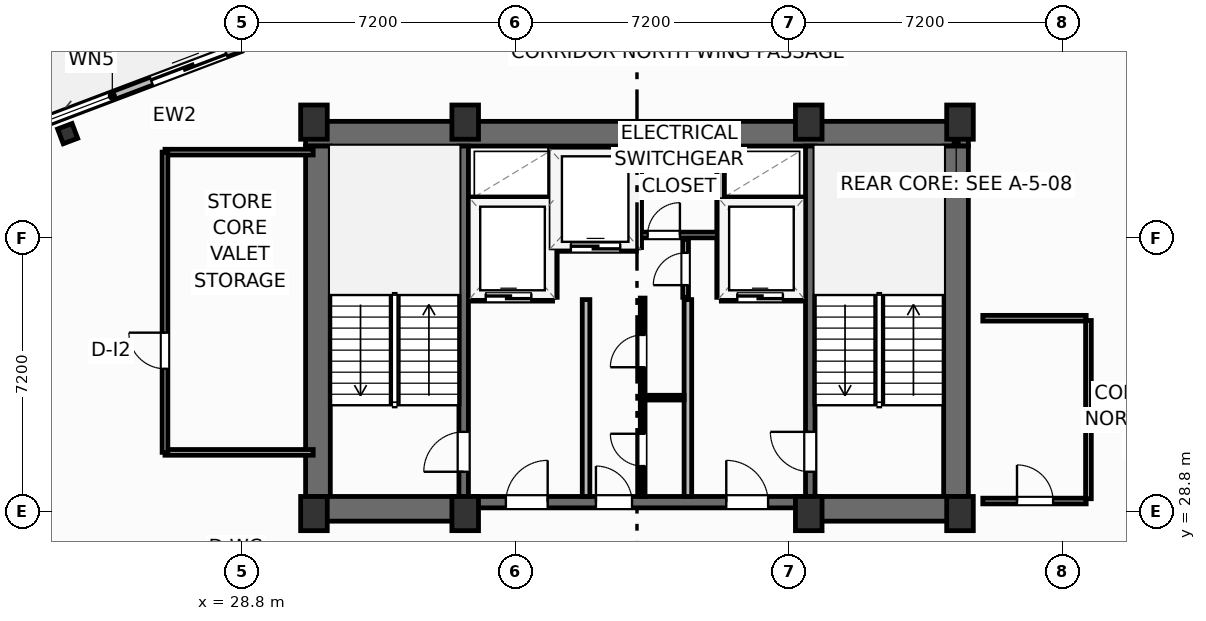
"""IFC4 building model, lengths in metres.
Left out: names, types, materials, properties, quantities, classifications, styles, units other than length and angle.
Written with IfcOpenShell. Run it as: python <this file> out.ifc"""

import sys

from ifc_helpers import new_model, si_unit, direction, frame, frame_2d, origin, origin_2d, place, context, subcontext, project, spatial, rectangle, i_section, extrude, element, fill, save


model = new_model("IFC4")
c1 = context("Model", 3, precision=1e-05, world=origin(), true_north=direction((0.0, 1.0)))
c2 = subcontext(c1, "Body", "Model", "MODEL_VIEW")
j1 = project(units=[si_unit("LENGTHUNIT", "METRE"), si_unit("PLANEANGLEUNIT", "RADIAN")], contexts=[c1])
p1 = place(None, origin())
s1 = spatial("IfcSite", under=j1, at=p1, CompositionType="ELEMENT")
p2 = place(p1, origin())
s2 = spatial("IfcBuilding", under=s1, at=p2, CompositionType="ELEMENT")
p3 = place(p2, frame((0.0, 0.0, 246.0)))
s3 = spatial("IfcBuildingStorey", under=s2, at=p3, CompositionType="ELEMENT", Elevation=246.0)
for number, where, z_axis, x_axis in (
    (1, (30.7, 28.75, 0.0), (0.0, 0.0, 1.0), (1.0, 0.0, 0.0)),
    (2, (34.68, 28.75, 0.0), (0.0, 0.0, 1.0), (1.0, 0.0, 0.0)),
    (3, (43.72, 28.75, 0.0), (0.0, 0.0, 1.0), (1.0, 0.0, 0.0)),
    (4, (47.7, 28.75, 0.0), (0.0, 0.0, 1.0), (1.0, 0.0, 0.0)),
    (5, (30.7, 39.05, 0.0), (0.0, 0.0, 1.0), (1.0, 0.0, 0.0)),
    (6, (34.68, 39.05, 0.0), (0.0, 0.0, 1.0), (1.0, 0.0, 0.0)),
    (7, (43.72, 39.05, 0.0), (0.0, 0.0, 1.0), (1.0, 0.0, 0.0)),
    (8, (47.7, 39.05, 0.0), (0.0, 0.0, 1.0), (1.0, 0.0, 0.0)),
):
    element("IfcColumn", number, at=place(p3, frame(where, z_axis=z_axis, x_axis=x_axis)), inside=s3, PredefinedType="COLUMN", context=c2, shape_type="SweptSolid", body=[
        extrude(rectangle(XDim=0.7, YDim=0.9, at=origin_2d()), origin(), (0.0, 0.0, 1.0), 3.7),
    ])
p4 = place(p3, frame((30.48, 38.745, 0.0), z_axis=(0.0, 0.0, 1.0), x_axis=(1.0, 0.0, 0.0)))
e9 = element("IfcWall", 9, at=p4, inside=s3, PredefinedType="SHEAR", context=c2, shape_type="SweptSolid", body=[
    extrude(rectangle(XDim=17.44, YDim=0.65, at=frame_2d((8.72, 0.0))), origin(), (0.0, 0.0, 1.0), 3.45),
])
for number, where, z_axis, x_axis in (
    (10, (30.805, 29.2, 0.0), (0.0, 0.0, 1.0), (0.0, 1.0, 0.0)),
    (11, (47.595, 29.2, 0.0), (0.0, 0.0, 1.0), (0.0, 1.0, 0.0)),
):
    element("IfcWall", number, at=place(p3, frame(where, z_axis=z_axis, x_axis=x_axis)), inside=s3, PredefinedType="SHEAR", context=c2, shape_type="SweptSolid", body=[
        extrude(rectangle(XDim=9.22, YDim=0.65, at=frame_2d((4.61, 0.0))), origin(), (0.0, 0.0, 1.0), 3.45),
    ])
p5 = place(p3, frame((30.48, 28.875, 0.0), z_axis=(0.0, 0.0, 1.0), x_axis=(1.0, 0.0, 0.0)))
e12 = element("IfcWall", 12, at=p5, inside=s3, PredefinedType="SHEAR", context=c2, shape_type="SweptSolid", body=[
    extrude(rectangle(XDim=4.32, YDim=0.65, at=frame_2d((2.16, 0.0))), origin(), (0.0, 0.0, 1.0), 3.45),
])
p6 = place(p3, frame((43.6, 28.875, 0.0), z_axis=(0.0, 0.0, 1.0), x_axis=(1.0, 0.0, 0.0)))
e13 = element("IfcWall", 13, at=p6, inside=s3, PredefinedType="SHEAR", context=c2, shape_type="SweptSolid", body=[
    extrude(rectangle(XDim=4.32, YDim=0.65, at=frame_2d((2.16, 0.0))), origin(), (0.0, 0.0, 1.0), 3.45),
])
p7 = place(p3, frame((34.8, 29.05, 0.0), z_axis=(0.0, 0.0, 1.0), x_axis=(1.0, 0.0, 0.0)))
e14 = element("IfcWall", 14, at=p7, inside=s3, PredefinedType="SHEAR", context=c2, shape_type="SweptSolid", body=[
    extrude(rectangle(XDim=8.8, YDim=0.3, at=frame_2d((4.4, 0.0))), origin(), (0.0, 0.0, 1.0), 3.45),
])
p8 = place(p7, frame((0.95, 0.0, 0.0)))
e15 = element("IfcOpeningElement", 15, at=p8, cuts=e14, PredefinedType="OPENING", context=c2, shape_type="SweptSolid", body=[
    extrude(rectangle(XDim=1.1, YDim=2.15, at=frame_2d((0.55, 1.075))), frame((0.0, 0.16, 0.0), z_axis=(0.0, -1.0, 0.0), x_axis=(1.0, 0.0, 0.0)), (0.0, 0.0, 1.0), 0.32),
])
p9 = place(p7, frame((6.75, 0.0, 0.0)))
e16 = element("IfcOpeningElement", 16, at=p9, cuts=e14, PredefinedType="OPENING", context=c2, shape_type="SweptSolid", body=[
    extrude(rectangle(XDim=1.1, YDim=2.15, at=frame_2d((0.55, 1.075))), frame((0.0, 0.16, 0.0), z_axis=(0.0, -1.0, 0.0), x_axis=(1.0, 0.0, 0.0)), (0.0, 0.0, 1.0), 0.32),
])
p10 = place(p7, frame((3.32, 0.0, 0.0)))
e17 = element("IfcOpeningElement", 17, at=p10, cuts=e14, PredefinedType="OPENING", context=c2, shape_type="SweptSolid", body=[
    extrude(rectangle(XDim=0.95, YDim=2.15, at=frame_2d((0.475, 1.075))), frame((0.0, 0.16, 0.0), z_axis=(0.0, -1.0, 0.0), x_axis=(1.0, 0.0, 0.0)), (0.0, 0.0, 1.0), 0.32),
])
p11 = place(p3, frame((34.64, 29.2, 0.0), z_axis=(0.0, 0.0, 1.0), x_axis=(0.0, 1.0, 0.0)))
e18 = element("IfcWall", 18, at=p11, inside=s3, PredefinedType="SHEAR", context=c2, shape_type="SweptSolid", body=[
    extrude(rectangle(XDim=9.22, YDim=0.25, at=frame_2d((4.61, 0.0))), origin(), (0.0, 0.0, 1.0), 3.45),
])
p12 = place(p11, frame((0.65, 0.0, 0.0)))
e19 = element("IfcOpeningElement", 19, at=p12, cuts=e18, PredefinedType="OPENING", context=c2, shape_type="SweptSolid", body=[
    extrude(rectangle(XDim=1.05, YDim=2.15, at=frame_2d((0.525, 1.075))), frame((0.0, 0.135, 0.0), z_axis=(0.0, -1.0, 0.0), x_axis=(1.0, 0.0, 0.0)), (0.0, 0.0, 1.0), 0.27),
])
p13 = place(p3, frame((43.76, 29.2, 0.0), z_axis=(0.0, 0.0, 1.0), x_axis=(0.0, 1.0, 0.0)))
e20 = element("IfcWall", 20, at=p13, inside=s3, PredefinedType="SHEAR", context=c2, shape_type="SweptSolid", body=[
    extrude(rectangle(XDim=9.22, YDim=0.25, at=frame_2d((4.61, 0.0))), origin(), (0.0, 0.0, 1.0), 3.45),
])
p14 = place(p13, frame((0.65, 0.0, 0.0)))
e21 = element("IfcOpeningElement", 21, at=p14, cuts=e20, PredefinedType="OPENING", context=c2, shape_type="SweptSolid", body=[
    extrude(rectangle(XDim=1.05, YDim=2.15, at=frame_2d((0.525, 1.075))), frame((0.0, 0.135, 0.0), z_axis=(0.0, -1.0, 0.0), x_axis=(1.0, 0.0, 0.0)), (0.0, 0.0, 1.0), 0.27),
])
p15 = place(p3, frame((24.219, 38.747, 0.0), z_axis=(0.0, 0.0, 1.0), x_axis=(0.935221751401, 0.354062530786, 0.0)))
e22 = element("IfcColumn", 22, at=p15, inside=s3, PredefinedType="COLUMN", context=c2, shape_type="SweptSolid", body=[
    extrude(i_section(OverallWidth=0.406, OverallDepth=0.416, WebThickness=0.03, FlangeThickness=0.048, FilletRadius=0.025, at=origin_2d()), origin(), (0.0, 0.0, 1.0), 3.7),
])
p16 = place(p3, frame((23.149, 38.887, 0.0), z_axis=(0.0, 0.0, 1.0), x_axis=(0.9352192676, 0.354069091436, 0.0)))
e23 = element("IfcWall", 23, at=p16, inside=s3, PredefinedType="SOLIDWALL", context=c2, shape_type="SweptSolid", body=[
    extrude(rectangle(XDim=6.0, YDim=0.22, at=frame_2d((3.0, 0.0))), origin(), (0.0, 0.0, 1.0), 2.73),
])
p17 = place(p16, frame((3.5, 0.0, 0.0)))
e24 = element("IfcOpeningElement", 24, at=p17, cuts=e23, PredefinedType="OPENING", context=c2, shape_type="SweptSolid", body=[
    extrude(rectangle(XDim=2.1, YDim=2.3, at=frame_2d((1.05, 1.15))), frame((0.0, 0.12, 0.0), z_axis=(0.0, -1.0, 0.0), x_axis=(1.0, 0.0, 0.0)), (0.0, 0.0, 1.0), 0.24),
])
p18 = place(p16, frame((0.55, 0.0, 0.75)))
e25 = element("IfcOpeningElement", 25, at=p18, cuts=e23, PredefinedType="OPENING", context=c2, shape_type="SweptSolid", body=[
    extrude(rectangle(XDim=1.85, YDim=1.75, at=frame_2d((0.925, 0.875))), frame((0.0, 0.12, 0.0), z_axis=(0.0, -1.0, 0.0), x_axis=(1.0, 0.0, 0.0)), (0.0, 0.0, 1.0), 0.24),
])
for number, where, z_axis, x_axis in (
    (26, (37.86, 29.2, 0.0), (0.0, 0.0, 1.0), (0.0, 1.0, 0.0)),
    (27, (40.54, 29.2, 0.0), (0.0, 0.0, 1.0), (0.0, 1.0, 0.0)),
):
    element("IfcWall", number, at=place(p3, frame(where, z_axis=z_axis, x_axis=x_axis)), inside=s3, PredefinedType="PARTITIONING", context=c2, shape_type="SweptSolid", body=[
        extrude(rectangle(XDim=5.18, YDim=0.2, at=frame_2d((2.59, 0.0))), origin(), (0.0, 0.0, 1.0), 3.45),
    ])
p19 = place(p3, frame((34.8, 34.44, 0.0), z_axis=(0.0, 0.0, 1.0), x_axis=(1.0, 0.0, 0.0)))
e28 = element("IfcWall", 28, at=p19, inside=s3, PredefinedType="PARTITIONING", context=c2, shape_type="SweptSolid", body=[
    extrude(rectangle(XDim=2.18, YDim=0.2, at=frame_2d((1.09, 0.0))), origin(), (0.0, 0.0, 1.0), 3.45),
])
p20 = place(p19, frame((0.42, 0.0, 0.0)))
e29 = element("IfcOpeningElement", 29, at=p20, cuts=e28, PredefinedType="OPENING", context=c2, shape_type="SweptSolid", body=[
    extrude(rectangle(XDim=1.2, YDim=2.2, at=frame_2d((0.6, 1.1))), frame((0.0, 0.11, 0.0), z_axis=(0.0, -1.0, 0.0), x_axis=(1.0, 0.0, 0.0)), (0.0, 0.0, 1.0), 0.22),
])
p21 = place(p3, frame((34.8, 36.98, 0.0), z_axis=(0.0, 0.0, 1.0), x_axis=(1.0, 0.0, 0.0)))
e30 = element("IfcWall", 30, at=p21, inside=s3, PredefinedType="PARTITIONING", context=c2, shape_type="SweptSolid", body=[
    extrude(rectangle(XDim=2.18, YDim=0.2, at=frame_2d((1.09, 0.0))), origin(), (0.0, 0.0, 1.0), 3.45),
])
p22 = place(p3, frame((37.0, 34.44, 0.0), z_axis=(0.0, 0.0, 1.0), x_axis=(0.0, 1.0, 0.0)))
e31 = element("IfcWall", 31, at=p22, inside=s3, PredefinedType="PARTITIONING", context=c2, shape_type="SweptSolid", body=[
    extrude(rectangle(XDim=3.9, YDim=0.2, at=frame_2d((1.95, 0.0))), origin(), (0.0, 0.0, 1.0), 3.45),
])
p23 = place(p3, frame((41.42, 34.44, 0.0), z_axis=(0.0, 0.0, 1.0), x_axis=(1.0, 0.0, 0.0)))
e32 = element("IfcWall", 32, at=p23, inside=s3, PredefinedType="PARTITIONING", context=c2, shape_type="SweptSolid", body=[
    extrude(rectangle(XDim=2.18, YDim=0.2, at=frame_2d((1.09, 0.0))), origin(), (0.0, 0.0, 1.0), 3.45),
])
p24 = place(p23, frame((0.42, 0.0, 0.0)))
e33 = element("IfcOpeningElement", 33, at=p24, cuts=e32, PredefinedType="OPENING", context=c2, shape_type="SweptSolid", body=[
    extrude(rectangle(XDim=1.2, YDim=2.2, at=frame_2d((0.6, 1.1))), frame((0.0, 0.11, 0.0), z_axis=(0.0, -1.0, 0.0), x_axis=(1.0, 0.0, 0.0)), (0.0, 0.0, 1.0), 0.22),
])
p25 = place(p3, frame((41.42, 36.98, 0.0), z_axis=(0.0, 0.0, 1.0), x_axis=(1.0, 0.0, 0.0)))
e34 = element("IfcWall", 34, at=p25, inside=s3, PredefinedType="PARTITIONING", context=c2, shape_type="SweptSolid", body=[
    extrude(rectangle(XDim=2.18, YDim=0.2, at=frame_2d((1.09, 0.0))), origin(), (0.0, 0.0, 1.0), 3.45),
])
p26 = place(p3, frame((41.4, 34.44, 0.0), z_axis=(0.0, 0.0, 1.0), x_axis=(0.0, 1.0, 0.0)))
e35 = element("IfcWall", 35, at=p26, inside=s3, PredefinedType="PARTITIONING", context=c2, shape_type="SweptSolid", body=[
    extrude(rectangle(XDim=3.9, YDim=0.2, at=frame_2d((1.95, 0.0))), origin(), (0.0, 0.0, 1.0), 3.45),
])
p27 = place(p3, frame((37.06, 35.75, 0.0), z_axis=(0.0, 0.0, 1.0), x_axis=(1.0, 0.0, 0.0)))
e36 = element("IfcWall", 36, at=p27, inside=s3, PredefinedType="PARTITIONING", context=c2, shape_type="SweptSolid", body=[
    extrude(rectangle(XDim=2.12, YDim=0.2, at=frame_2d((1.06, 0.0))), origin(), (0.0, 0.0, 1.0), 3.45),
])
p28 = place(p27, frame((0.4, 0.0, 0.0)))
e37 = element("IfcOpeningElement", 37, at=p28, cuts=e36, PredefinedType="OPENING", context=c2, shape_type="SweptSolid", body=[
    extrude(rectangle(XDim=1.3, YDim=2.2, at=frame_2d((0.65, 1.1))), frame((0.0, 0.11, 0.0), z_axis=(0.0, -1.0, 0.0), x_axis=(1.0, 0.0, 0.0)), (0.0, 0.0, 1.0), 0.22),
])
p29 = place(p3, frame((39.22, 35.75, 0.0), z_axis=(0.0, 0.0, 1.0), x_axis=(0.0, 1.0, 0.0)))
e38 = element("IfcWall", 38, at=p29, inside=s3, PredefinedType="PARTITIONING", context=c2, shape_type="SweptSolid", body=[
    extrude(rectangle(XDim=2.59, YDim=0.2, at=frame_2d((1.295, 0.0))), origin(), (0.0, 0.0, 1.0), 3.45),
])
p30 = place(p3, frame((39.3, 36.08, 0.0), z_axis=(0.0, 0.0, 1.0), x_axis=(1.0, 0.0, 0.0)))
e39 = element("IfcWall", 39, at=p30, inside=s3, PredefinedType="PARTITIONING", context=c2, shape_type="SweptSolid", body=[
    extrude(rectangle(XDim=2.02, YDim=0.15, at=frame_2d((1.01, 0.0))), origin(), (0.0, 0.0, 1.0), 3.45),
])
p31 = place(p30, frame((0.18, 0.0, 0.0)))
e40 = element("IfcOpeningElement", 40, at=p31, cuts=e39, PredefinedType="OPENING", context=c2, shape_type="SweptSolid", body=[
    extrude(rectangle(XDim=0.85, YDim=2.05, at=frame_2d((0.425, 1.025))), frame((0.0, 0.085, 0.0), z_axis=(0.0, -1.0, 0.0), x_axis=(1.0, 0.0, 0.0)), (0.0, 0.0, 1.0), 0.17),
])
p32 = place(p3, frame((40.48, 34.44, 0.0), z_axis=(0.0, 0.0, 1.0), x_axis=(0.0, 1.0, 0.0)))
e41 = element("IfcWall", 41, at=p32, inside=s3, PredefinedType="PARTITIONING", context=c2, shape_type="SweptSolid", body=[
    extrude(rectangle(XDim=1.52, YDim=0.15, at=frame_2d((0.76, 0.0))), origin(), (0.0, 0.0, 1.0), 3.45),
])
p33 = place(p32, frame((0.32, 0.0, 0.0)))
e42 = element("IfcOpeningElement", 42, at=p33, cuts=e41, PredefinedType="OPENING", context=c2, shape_type="SweptSolid", body=[
    extrude(rectangle(XDim=0.85, YDim=2.05, at=frame_2d((0.425, 1.025))), frame((0.0, 0.085, 0.0), z_axis=(0.0, -1.0, 0.0), x_axis=(1.0, 0.0, 0.0)), (0.0, 0.0, 1.0), 0.17),
])
p34 = place(p3, frame((39.35, 31.8, 0.0), z_axis=(0.0, 0.0, 1.0), x_axis=(1.0, 0.0, 0.0)))
e43 = element("IfcWall", 43, at=p34, inside=s3, PredefinedType="PARTITIONING", context=c2, shape_type="SweptSolid", body=[
    extrude(rectangle(XDim=1.09, YDim=0.125, at=frame_2d((0.545, 0.0))), origin(), (0.0, 0.0, 1.0), 3.45),
])
p35 = place(p3, frame((39.35, 29.2, 0.0), z_axis=(0.0, 0.0, 1.0), x_axis=(0.0, 1.0, 0.0)))
e44 = element("IfcWall", 44, at=p35, inside=s3, PredefinedType="PARTITIONING", context=c2, shape_type="SweptSolid", body=[
    extrude(rectangle(XDim=5.22, YDim=0.125, at=frame_2d((2.61, 0.0))), origin(), (0.0, 0.0, 1.0), 3.45),
])
p36 = place(p35, frame((0.8, 0.0, 0.0)))
e45 = element("IfcOpeningElement", 45, at=p36, cuts=e44, PredefinedType="OPENING", context=c2, shape_type="SweptSolid", body=[
    extrude(rectangle(XDim=0.85, YDim=2.05, at=frame_2d((0.425, 1.025))), frame((0.0, 0.073, 0.0), z_axis=(0.0, -1.0, 0.0), x_axis=(1.0, 0.0, 0.0)), (0.0, 0.0, 1.0), 0.145),
])
p37 = place(p35, frame((3.4, 0.0, 0.0)))
e46 = element("IfcOpeningElement", 46, at=p37, cuts=e44, PredefinedType="OPENING", context=c2, shape_type="SweptSolid", body=[
    extrude(rectangle(XDim=0.85, YDim=2.05, at=frame_2d((0.425, 1.025))), frame((0.0, 0.073, 0.0), z_axis=(0.0, -1.0, 0.0), x_axis=(1.0, 0.0, 0.0)), (0.0, 0.0, 1.0), 0.145),
])
for number, where, z_axis, x_axis in (
    (47, (26.78, 30.36, 0.0), (0.0, 0.0, 1.0), (1.0, 0.0, 0.0)),
    (48, (26.78, 38.26, 0.0), (0.0, 0.0, 1.0), (1.0, 0.0, 0.0)),
):
    element("IfcWall", number, at=place(p3, frame(where, z_axis=z_axis, x_axis=x_axis)), inside=s3, PredefinedType="PARTITIONING", context=c2, shape_type="SweptSolid", body=[
        extrude(rectangle(XDim=3.9, YDim=0.15, at=frame_2d((1.95, 0.0))), origin(), (0.0, 0.0, 1.0), 3.45),
    ])
p38 = place(p3, frame((26.78, 30.36, 0.0), z_axis=(0.0, 0.0, 1.0), x_axis=(0.0, 1.0, 0.0)))
e49 = element("IfcWall", 49, at=p38, inside=s3, PredefinedType="PARTITIONING", context=c2, shape_type="SweptSolid", body=[
    extrude(rectangle(XDim=7.9, YDim=0.15, at=frame_2d((3.95, 0.0))), origin(), (0.0, 0.0, 1.0), 3.45),
])
p39 = place(p38, frame((2.2, 0.0, 0.0)))
e50 = element("IfcOpeningElement", 50, at=p39, cuts=e49, PredefinedType="OPENING", context=c2, shape_type="SweptSolid", body=[
    extrude(rectangle(XDim=0.95, YDim=2.05, at=frame_2d((0.475, 1.025))), frame((0.0, 0.085, 0.0), z_axis=(0.0, -1.0, 0.0), x_axis=(1.0, 0.0, 0.0)), (0.0, 0.0, 1.0), 0.17),
])
p40 = place(p3, frame((48.3, 29.08, 0.0), z_axis=(0.0, 0.0, 1.0), x_axis=(1.0, 0.0, 0.0)))
e51 = element("IfcWall", 51, at=p40, inside=s3, PredefinedType="PARTITIONING", context=c2, shape_type="SweptSolid", body=[
    extrude(rectangle(XDim=2.72, YDim=0.15, at=frame_2d((1.36, 0.0))), origin(), (0.0, 0.0, 1.0), 2.662),
])
p41 = place(p40, frame((0.9, 0.0, 0.0)))
e52 = element("IfcOpeningElement", 52, at=p41, cuts=e51, PredefinedType="OPENING", context=c2, shape_type="SweptSolid", body=[
    extrude(rectangle(XDim=0.95, YDim=2.05, at=frame_2d((0.475, 1.025))), frame((0.0, 0.085, 0.0), z_axis=(0.0, -1.0, 0.0), x_axis=(1.0, 0.0, 0.0)), (0.0, 0.0, 1.0), 0.17),
])
p42 = place(p3, frame((48.3, 33.89, 0.0), z_axis=(0.0, 0.0, 1.0), x_axis=(1.0, 0.0, 0.0)))
e53 = element("IfcWall", 53, at=p42, inside=s3, PredefinedType="PARTITIONING", context=c2, shape_type="SweptSolid", body=[
    extrude(rectangle(XDim=2.72, YDim=0.15, at=frame_2d((1.36, 0.0))), origin(), (0.0, 0.0, 1.0), 3.45),
])
p43 = place(p3, frame((51.08, 29.14, 0.0), z_axis=(0.0, 0.0, 1.0), x_axis=(0.0, 1.0, 0.0)))
e54 = element("IfcWall", 54, at=p43, inside=s3, PredefinedType="PARTITIONING", context=c2, shape_type="SweptSolid", body=[
    extrude(rectangle(XDim=4.69, YDim=0.15, at=frame_2d((2.345, 0.0))), origin(), (0.0, 0.0, 1.0), 3.45),
])
p44 = place(p17, origin())
e55 = element("IfcDoor", 55, at=p44, inside=s3, OperationType="SLIDING_TO_LEFT", PredefinedType="DOOR", context=c2, shape_type="SweptSolid", body=[
    extrude(rectangle(XDim=2.1, YDim=2.3, at=frame_2d((1.05, 1.15))), frame((0.0, 0.025, 0.0), z_axis=(0.0, -1.0, 0.0), x_axis=(1.0, 0.0, 0.0)), (0.0, 0.0, 1.0), 0.05),
])
fill(e24, e55)
p45 = place(p18, origin())
e56 = element("IfcWindow", 56, at=p45, inside=s3, PartitioningType="SINGLE_PANEL", PredefinedType="WINDOW", context=c2, shape_type="SweptSolid", body=[
    extrude(rectangle(XDim=1.85, YDim=1.75, at=frame_2d((0.925, 0.875))), frame((0.0, 0.03, 0.0), z_axis=(0.0, -1.0, 0.0), x_axis=(1.0, 0.0, 0.0)), (0.0, 0.0, 1.0), 0.06),
])
fill(e25, e56)
p46 = place(p12, origin())
e57 = element("IfcDoor", 57, at=p46, inside=s3, OperationType="SINGLE_SWING_LEFT", PredefinedType="DOOR", context=c2, shape_type="SweptSolid", body=[
    extrude(rectangle(XDim=1.05, YDim=2.15, at=frame_2d((0.525, 1.075))), frame((0.0, 0.025, 0.0), z_axis=(0.0, -1.0, 0.0), x_axis=(1.0, 0.0, 0.0)), (0.0, 0.0, 1.0), 0.05),
])
fill(e19, e57)
p47 = place(p14, origin())
e58 = element("IfcDoor", 58, at=p47, inside=s3, OperationType="SINGLE_SWING_RIGHT", PredefinedType="DOOR", context=c2, shape_type="SweptSolid", body=[
    extrude(rectangle(XDim=1.05, YDim=2.15, at=frame_2d((0.525, 1.075))), frame((0.0, 0.025, 0.0), z_axis=(0.0, -1.0, 0.0), x_axis=(1.0, 0.0, 0.0)), (0.0, 0.0, 1.0), 0.05),
])
fill(e21, e58)
p48 = place(p8, origin())
e59 = element("IfcDoor", 59, at=p48, inside=s3, OperationType="SINGLE_SWING_RIGHT", PredefinedType="DOOR", context=c2, shape_type="SweptSolid", body=[
    extrude(rectangle(XDim=1.1, YDim=2.15, at=frame_2d((0.55, 1.075))), frame((0.0, 0.025, 0.0), z_axis=(0.0, -1.0, 0.0), x_axis=(1.0, 0.0, 0.0)), (0.0, 0.0, 1.0), 0.05),
])
fill(e15, e59)
p49 = place(p9, origin())
e60 = element("IfcDoor", 60, at=p49, inside=s3, OperationType="SINGLE_SWING_LEFT", PredefinedType="DOOR", context=c2, shape_type="SweptSolid", body=[
    extrude(rectangle(XDim=1.1, YDim=2.15, at=frame_2d((0.55, 1.075))), frame((0.0, 0.025, 0.0), z_axis=(0.0, -1.0, 0.0), x_axis=(1.0, 0.0, 0.0)), (0.0, 0.0, 1.0), 0.05),
])
fill(e16, e60)
p50 = place(p20, origin())
e61 = element("IfcDoor", 61, at=p50, inside=s3, OperationType="SLIDING_TO_LEFT", PredefinedType="DOOR", context=c2, shape_type="SweptSolid", body=[
    extrude(rectangle(XDim=1.2, YDim=2.2, at=frame_2d((0.6, 1.1))), frame((0.0, 0.025, 0.0), z_axis=(0.0, -1.0, 0.0), x_axis=(1.0, 0.0, 0.0)), (0.0, 0.0, 1.0), 0.05),
])
fill(e29, e61)
p51 = place(p24, origin())
e62 = element("IfcDoor", 62, at=p51, inside=s3, OperationType="SLIDING_TO_LEFT", PredefinedType="DOOR", context=c2, shape_type="SweptSolid", body=[
    extrude(rectangle(XDim=1.2, YDim=2.2, at=frame_2d((0.6, 1.1))), frame((0.0, 0.025, 0.0), z_axis=(0.0, -1.0, 0.0), x_axis=(1.0, 0.0, 0.0)), (0.0, 0.0, 1.0), 0.05),
])
fill(e33, e62)
p52 = place(p28, origin())
e63 = element("IfcDoor", 63, at=p52, inside=s3, OperationType="SLIDING_TO_LEFT", PredefinedType="DOOR", context=c2, shape_type="SweptSolid", body=[
    extrude(rectangle(XDim=1.3, YDim=2.2, at=frame_2d((0.65, 1.1))), frame((0.0, 0.025, 0.0), z_axis=(0.0, -1.0, 0.0), x_axis=(1.0, 0.0, 0.0)), (0.0, 0.0, 1.0), 0.05),
])
fill(e37, e63)
p53 = place(p31, origin())
e64 = element("IfcDoor", 64, at=p53, inside=s3, OperationType="SINGLE_SWING_RIGHT", PredefinedType="DOOR", context=c2, shape_type="SweptSolid", body=[
    extrude(rectangle(XDim=0.85, YDim=2.05, at=frame_2d((0.425, 1.025))), frame((0.0, 0.025, 0.0), z_axis=(0.0, -1.0, 0.0), x_axis=(1.0, 0.0, 0.0)), (0.0, 0.0, 1.0), 0.05),
])
fill(e40, e64)
p54 = place(p33, origin())
e65 = element("IfcDoor", 65, at=p54, inside=s3, OperationType="SINGLE_SWING_LEFT", PredefinedType="DOOR", context=c2, shape_type="SweptSolid", body=[
    extrude(rectangle(XDim=0.85, YDim=2.05, at=frame_2d((0.425, 1.025))), frame((0.0, 0.025, 0.0), z_axis=(0.0, -1.0, 0.0), x_axis=(1.0, 0.0, 0.0)), (0.0, 0.0, 1.0), 0.05),
])
fill(e42, e65)
p55 = place(p36, origin())
e66 = element("IfcDoor", 66, at=p55, inside=s3, OperationType="SINGLE_SWING_RIGHT", PredefinedType="DOOR", context=c2, shape_type="SweptSolid", body=[
    extrude(rectangle(XDim=0.85, YDim=2.05, at=frame_2d((0.425, 1.025))), frame((0.0, 0.025, 0.0), z_axis=(0.0, -1.0, 0.0), x_axis=(1.0, 0.0, 0.0)), (0.0, 0.0, 1.0), 0.05),
])
fill(e45, e66)
p56 = place(p37, origin())
e67 = element("IfcDoor", 67, at=p56, inside=s3, OperationType="SINGLE_SWING_LEFT", PredefinedType="DOOR", context=c2, shape_type="SweptSolid", body=[
    extrude(rectangle(XDim=0.85, YDim=2.05, at=frame_2d((0.425, 1.025))), frame((0.0, 0.025, 0.0), z_axis=(0.0, -1.0, 0.0), x_axis=(1.0, 0.0, 0.0)), (0.0, 0.0, 1.0), 0.05),
])
fill(e46, e67)
p57 = place(p10, origin())
e68 = element("IfcDoor", 68, at=p57, inside=s3, OperationType="SINGLE_SWING_LEFT", PredefinedType="DOOR", context=c2, shape_type="SweptSolid", body=[
    extrude(rectangle(XDim=0.95, YDim=2.15, at=frame_2d((0.475, 1.075))), frame((0.0, 0.025, 0.0), z_axis=(0.0, -1.0, 0.0), x_axis=(1.0, 0.0, 0.0)), (0.0, 0.0, 1.0), 0.05),
])
fill(e17, e68)
p58 = place(p39, origin())
e69 = element("IfcDoor", 69, at=p58, inside=s3, OperationType="SINGLE_SWING_RIGHT", PredefinedType="DOOR", context=c2, shape_type="SweptSolid", body=[
    extrude(rectangle(XDim=0.95, YDim=2.05, at=frame_2d((0.475, 1.025))), frame((0.0, 0.025, 0.0), z_axis=(0.0, -1.0, 0.0), x_axis=(1.0, 0.0, 0.0)), (0.0, 0.0, 1.0), 0.05),
])
fill(e50, e69)
p59 = place(p41, origin())
e70 = element("IfcDoor", 70, at=p59, inside=s3, OperationType="SINGLE_SWING_LEFT", PredefinedType="DOOR", context=c2, shape_type="SweptSolid", body=[
    extrude(rectangle(XDim=0.95, YDim=2.05, at=frame_2d((0.475, 1.025))), frame((0.0, 0.025, 0.0), z_axis=(0.0, -1.0, 0.0), x_axis=(1.0, 0.0, 0.0)), (0.0, 0.0, 1.0), 0.05),
])
fill(e52, e70)
save(model, sys.argv[1])
